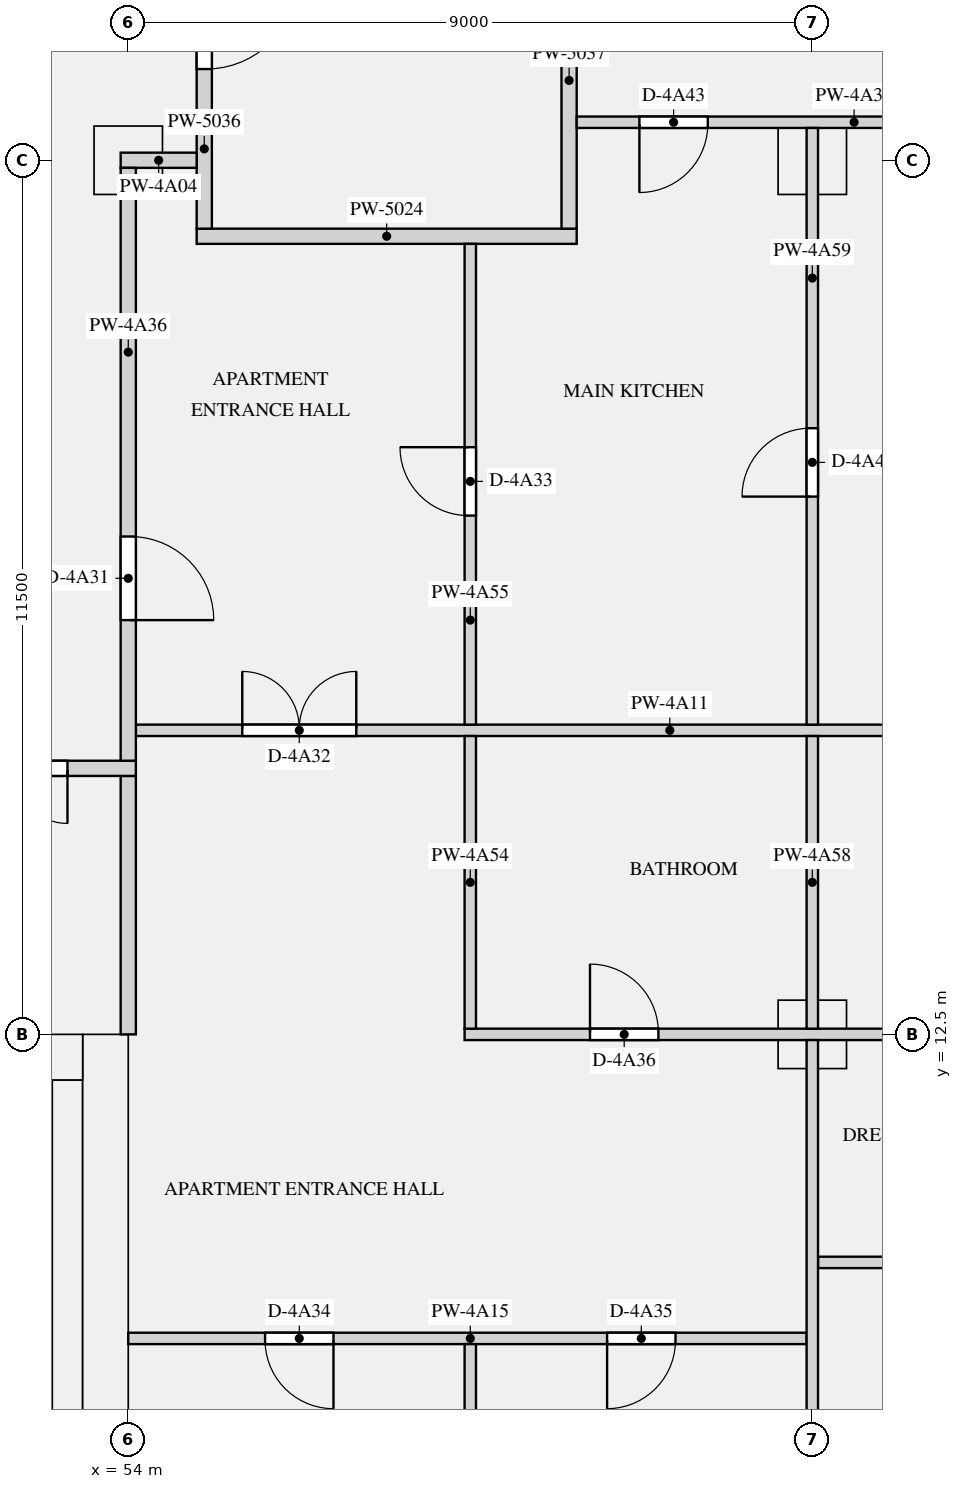
"""IFC4 building model, lengths in metres.
Left out: names, types, materials, properties, quantities, classifications, styles, units other than length and angle.
Written with IfcOpenShell. Run it as: python <this file> out.ifc"""

import sys

from ifc_helpers import new_model, si_unit, direction, frame, frame_2d, origin, origin_2d, place, context, subcontext, project, spatial, rectangle, extrude, element, fill, save


model = new_model("IFC4")
c1 = context("Model", 3, precision=1e-05, world=origin(), true_north=direction((0.0, 1.0)))
c2 = subcontext(c1, "Body", "Model", "MODEL_VIEW")
j1 = project(units=[si_unit("LENGTHUNIT", "METRE"), si_unit("PLANEANGLEUNIT", "RADIAN")], contexts=[c1])
p1 = place(None, origin())
s1 = spatial("IfcSite", under=j1, at=p1, CompositionType="ELEMENT")
p2 = place(p1, origin())
s2 = spatial("IfcBuilding", under=s1, at=p2, CompositionType="ELEMENT")
p3 = place(p2, frame((0.0, 0.0, 198.0)))
s3 = spatial("IfcBuildingStorey", under=s2, at=p3, CompositionType="ELEMENT", Elevation=198.0)
for number, where, z_axis, x_axis in (
    (1, (54.0, 24.0, 0.0), (0.0, 0.0, 1.0), (1.0, 0.0, 0.0)),
    (2, (63.0, 24.0, 0.0), (0.0, 0.0, 1.0), (1.0, 0.0, 0.0)),
    (3, (63.0, 12.5, 0.0), (0.0, 0.0, 1.0), (1.0, 0.0, 0.0)),
):
    element("IfcColumn", number, at=place(p3, frame(where, z_axis=z_axis, x_axis=x_axis)), inside=s3, PredefinedType="COLUMN", context=c2, shape_type="SweptSolid", body=[
        extrude(rectangle(XDim=0.9, YDim=0.9, at=origin_2d()), origin(), (0.0, 0.0, 1.0), 3.15),
    ])
p4 = place(p3, frame((53.7, 0.0, 0.0), z_axis=(0.0, 0.0, 1.0), x_axis=(0.0, 1.0, 0.0)))
e4 = element("IfcWall", 4, at=p4, inside=s3, PredefinedType="SHEAR", context=c2, shape_type="SweptSolid", body=[
    extrude(rectangle(XDim=12.5, YDim=0.6, at=frame_2d((6.25, 0.0))), origin(), (0.0, 0.0, 1.0), 3.15),
])
p5 = place(p3, frame((18.6, 12.2, 0.0), z_axis=(0.0, 0.0, 1.0), x_axis=(1.0, 0.0, 0.0)))
e5 = element("IfcWall", 5, at=p5, inside=s3, PredefinedType="SHEAR", context=c2, shape_type="SweptSolid", body=[
    extrude(rectangle(XDim=34.8, YDim=0.6, at=frame_2d((17.4, 0.0))), origin(), (0.0, 0.0, 1.0), 3.15),
])
p6 = place(p5, frame((24.575, 0.0, 0.0)))
e6 = element("IfcOpeningElement", 6, at=p6, cuts=e5, PredefinedType="OPENING", context=c2, shape_type="SweptSolid", body=[
    extrude(rectangle(XDim=1.1, YDim=2.1, at=frame_2d((0.55, 1.05))), frame((0.0, 0.31, 0.0), z_axis=(0.0, -1.0, 0.0), x_axis=(1.0, 0.0, 0.0)), (0.0, 0.0, 1.0), 0.62),
])
p7 = place(p5, frame((26.825, 0.0, 0.0)))
e7 = element("IfcOpeningElement", 7, at=p7, cuts=e5, PredefinedType="OPENING", context=c2, shape_type="SweptSolid", body=[
    extrude(rectangle(XDim=1.1, YDim=2.1, at=frame_2d((0.55, 1.05))), frame((0.0, 0.31, 0.0), z_axis=(0.0, -1.0, 0.0), x_axis=(1.0, 0.0, 0.0)), (0.0, 0.0, 1.0), 0.62),
])
p8 = place(p5, frame((29.075, 0.0, 0.0)))
e8 = element("IfcOpeningElement", 8, at=p8, cuts=e5, PredefinedType="OPENING", context=c2, shape_type="SweptSolid", body=[
    extrude(rectangle(XDim=1.1, YDim=2.1, at=frame_2d((0.55, 1.05))), frame((0.0, 0.31, 0.0), z_axis=(0.0, -1.0, 0.0), x_axis=(1.0, 0.0, 0.0)), (0.0, 0.0, 1.0), 0.62),
])
p9 = place(p5, frame((4.95, 0.0, 0.0)))
e9 = element("IfcOpeningElement", 9, at=p9, cuts=e5, PredefinedType="OPENING", context=c2, shape_type="SweptSolid", body=[
    extrude(rectangle(XDim=0.9, YDim=2.1, at=frame_2d((0.45, 1.05))), frame((0.0, 0.31, 0.0), z_axis=(0.0, -1.0, 0.0), x_axis=(1.0, 0.0, 0.0)), (0.0, 0.0, 1.0), 0.62),
])
p10 = place(p5, frame((18.45, 0.0, 0.0)))
e10 = element("IfcOpeningElement", 10, at=p10, cuts=e5, PredefinedType="OPENING", context=c2, shape_type="SweptSolid", body=[
    extrude(rectangle(XDim=0.9, YDim=2.1, at=frame_2d((0.45, 1.05))), frame((0.0, 0.31, 0.0), z_axis=(0.0, -1.0, 0.0), x_axis=(1.0, 0.0, 0.0)), (0.0, 0.0, 1.0), 0.62),
])
p11 = place(p5, frame((1.55, 0.0, 0.0)))
e11 = element("IfcOpeningElement", 11, at=p11, cuts=e5, PredefinedType="OPENING", context=c2, shape_type="SweptSolid", body=[
    extrude(rectangle(XDim=1.2, YDim=2.1, at=frame_2d((0.6, 1.05))), frame((0.0, 0.31, 0.0), z_axis=(0.0, -1.0, 0.0), x_axis=(1.0, 0.0, 0.0)), (0.0, 0.0, 1.0), 0.62),
])
p12 = place(p5, frame((32.05, 0.0, 0.0)))
e12 = element("IfcOpeningElement", 12, at=p12, cuts=e5, PredefinedType="OPENING", context=c2, shape_type="SweptSolid", body=[
    extrude(rectangle(XDim=1.2, YDim=2.1, at=frame_2d((0.6, 1.05))), frame((0.0, 0.31, 0.0), z_axis=(0.0, -1.0, 0.0), x_axis=(1.0, 0.0, 0.0)), (0.0, 0.0, 1.0), 0.62),
])
p13 = place(p3, frame((53.2, 1.0, 0.0), z_axis=(0.0, 0.0, 1.0), x_axis=(0.0, 1.0, 0.0)))
e13 = element("IfcWall", 13, at=p13, inside=s3, PredefinedType="SHEAR", context=c2, shape_type="SweptSolid", body=[
    extrude(rectangle(XDim=10.9, YDim=0.4, at=frame_2d((5.45, 0.0))), origin(), (0.0, 0.0, 1.0), 3.15),
])
p14 = place(p3, frame((54.9, 23.0, 0.0), z_axis=(0.0, 0.0, 1.0), x_axis=(1.0, 0.0, 0.0)))
e14 = element("IfcWall", 14, at=p14, inside=s3, PredefinedType="PARTITIONING", context=c2, shape_type="SweptSolid", body=[
    extrude(rectangle(XDim=5.0, YDim=0.2, at=frame_2d((2.5, 0.0))), origin(), (0.0, 0.0, 1.0), 2.83),
])
p15 = place(p3, frame((54.0, 12.5, 0.0), z_axis=(0.0, 0.0, 1.0), x_axis=(0.0, 1.0, 0.0)))
e15 = element("IfcWall", 15, at=p15, inside=s3, PredefinedType="PARTITIONING", context=c2, shape_type="SweptSolid", body=[
    extrude(rectangle(XDim=3.4, YDim=0.2, at=frame_2d((1.7, 0.0))), origin(), (0.0, 0.0, 1.0), 2.83),
])
p16 = place(p3, frame((55.0, 23.1, 0.0), z_axis=(0.0, 0.0, 1.0), x_axis=(0.0, 1.0, 0.0)))
e16 = element("IfcWall", 16, at=p16, inside=s3, PredefinedType="PARTITIONING", context=c2, shape_type="SweptSolid", body=[
    extrude(rectangle(XDim=3.8, YDim=0.2, at=frame_2d((1.9, 0.0))), origin(), (0.0, 0.0, 1.0), 2.83),
])
p17 = place(p16, frame((2.1, 0.0, 0.0)))
e17 = element("IfcOpeningElement", 17, at=p17, cuts=e16, PredefinedType="OPENING", context=c2, shape_type="SweptSolid", body=[
    extrude(rectangle(XDim=1.2, YDim=2.1, at=frame_2d((0.6, 1.05))), frame((0.0, 0.11, 0.0), z_axis=(0.0, -1.0, 0.0), x_axis=(1.0, 0.0, 0.0)), (0.0, 0.0, 1.0), 0.22),
])
p18 = place(p3, frame((59.8, 23.1, 0.0), z_axis=(0.0, 0.0, 1.0), x_axis=(0.0, 1.0, 0.0)))
e18 = element("IfcWall", 18, at=p18, inside=s3, PredefinedType="PARTITIONING", context=c2, shape_type="SweptSolid", body=[
    extrude(rectangle(XDim=3.9, YDim=0.2, at=frame_2d((1.95, 0.0))), origin(), (0.0, 0.0, 1.0), 2.83),
])
p19 = place(p3, frame((53.9, 24.0, 0.0), z_axis=(0.0, 0.0, 1.0), x_axis=(1.0, 0.0, 0.0)))
e19 = element("IfcWall", 19, at=p19, inside=s3, PredefinedType="PARTITIONING", context=c2, shape_type="SweptSolid", body=[
    extrude(rectangle(XDim=1.0, YDim=0.2, at=frame_2d((0.5, 0.0))), origin(), (0.0, 0.0, 1.0), 2.83),
])
p20 = place(p3, frame((54.1, 16.5, 0.0), z_axis=(0.0, 0.0, 1.0), x_axis=(1.0, 0.0, 0.0)))
e20 = element("IfcWall", 20, at=p20, inside=s3, PredefinedType="PARTITIONING", context=c2, shape_type="SweptSolid", body=[
    extrude(rectangle(XDim=14.75, YDim=0.15, at=frame_2d((7.375, 0.0))), origin(), (0.0, 0.0, 1.0), 2.83),
])
p21 = place(p20, frame((1.4, 0.0, 0.0)))
e21 = element("IfcOpeningElement", 21, at=p21, cuts=e20, PredefinedType="OPENING", context=c2, shape_type="SweptSolid", body=[
    extrude(rectangle(XDim=1.5, YDim=2.1, at=frame_2d((0.75, 1.05))), frame((0.0, 0.085, 0.0), z_axis=(0.0, -1.0, 0.0), x_axis=(1.0, 0.0, 0.0)), (0.0, 0.0, 1.0), 0.17),
])
p22 = place(p20, frame((11.15, 0.0, 0.0)))
e22 = element("IfcOpeningElement", 22, at=p22, cuts=e20, PredefinedType="OPENING", context=c2, shape_type="SweptSolid", body=[
    extrude(rectangle(XDim=1.5, YDim=2.1, at=frame_2d((0.75, 1.05))), frame((0.0, 0.085, 0.0), z_axis=(0.0, -1.0, 0.0), x_axis=(1.0, 0.0, 0.0)), (0.0, 0.0, 1.0), 0.17),
])
p23 = place(p3, frame((58.425, 12.5, 0.0), z_axis=(0.0, 0.0, 1.0), x_axis=(1.0, 0.0, 0.0)))
e23 = element("IfcWall", 23, at=p23, inside=s3, PredefinedType="PARTITIONING", context=c2, shape_type="SweptSolid", body=[
    extrude(rectangle(XDim=12.925, YDim=0.15, at=frame_2d((6.462, 0.0))), origin(), (0.0, 0.0, 1.0), 2.83),
])
p24 = place(p23, frame((1.65, 0.0, 0.0)))
e24 = element("IfcOpeningElement", 24, at=p24, cuts=e23, PredefinedType="OPENING", context=c2, shape_type="SweptSolid", body=[
    extrude(rectangle(XDim=0.9, YDim=2.1, at=frame_2d((0.45, 1.05))), frame((0.0, 0.085, 0.0), z_axis=(0.0, -1.0, 0.0), x_axis=(1.0, 0.0, 0.0)), (0.0, 0.0, 1.0), 0.17),
])
p25 = place(p23, frame((10.625, 0.0, 0.0)))
e25 = element("IfcOpeningElement", 25, at=p25, cuts=e23, PredefinedType="OPENING", context=c2, shape_type="SweptSolid", body=[
    extrude(rectangle(XDim=0.9, YDim=2.1, at=frame_2d((0.45, 1.05))), frame((0.0, 0.085, 0.0), z_axis=(0.0, -1.0, 0.0), x_axis=(1.0, 0.0, 0.0)), (0.0, 0.0, 1.0), 0.17),
])
p26 = place(p3, frame((54.0, 8.5, 0.0), z_axis=(0.0, 0.0, 1.0), x_axis=(1.0, 0.0, 0.0)))
e26 = element("IfcWall", 26, at=p26, inside=s3, PredefinedType="PARTITIONING", context=c2, shape_type="SweptSolid", body=[
    extrude(rectangle(XDim=8.925, YDim=0.15, at=frame_2d((4.462, 0.0))), origin(), (0.0, 0.0, 1.0), 2.83),
])
p27 = place(p26, frame((1.8, 0.0, 0.0)))
e27 = element("IfcOpeningElement", 27, at=p27, cuts=e26, PredefinedType="OPENING", context=c2, shape_type="SweptSolid", body=[
    extrude(rectangle(XDim=0.9, YDim=2.1, at=frame_2d((0.45, 1.05))), frame((0.0, 0.085, 0.0), z_axis=(0.0, -1.0, 0.0), x_axis=(1.0, 0.0, 0.0)), (0.0, 0.0, 1.0), 0.17),
])
p28 = place(p26, frame((6.3, 0.0, 0.0)))
e28 = element("IfcOpeningElement", 28, at=p28, cuts=e26, PredefinedType="OPENING", context=c2, shape_type="SweptSolid", body=[
    extrude(rectangle(XDim=0.9, YDim=2.1, at=frame_2d((0.45, 1.05))), frame((0.0, 0.085, 0.0), z_axis=(0.0, -1.0, 0.0), x_axis=(1.0, 0.0, 0.0)), (0.0, 0.0, 1.0), 0.17),
])
p29 = place(p3, frame((63.075, 9.5, 0.0), z_axis=(0.0, 0.0, 1.0), x_axis=(1.0, 0.0, 0.0)))
e29 = element("IfcWall", 29, at=p29, inside=s3, PredefinedType="PARTITIONING", context=c2, shape_type="SweptSolid", body=[
    extrude(rectangle(XDim=4.5, YDim=0.15, at=frame_2d((2.25, 0.0))), origin(), (0.0, 0.0, 1.0), 2.83),
])
p30 = place(p29, frame((1.725, 0.0, 0.0)))
e30 = element("IfcOpeningElement", 30, at=p30, cuts=e29, PredefinedType="OPENING", context=c2, shape_type="SweptSolid", body=[
    extrude(rectangle(XDim=0.9, YDim=2.1, at=frame_2d((0.45, 1.05))), frame((0.0, 0.085, 0.0), z_axis=(0.0, -1.0, 0.0), x_axis=(1.0, 0.0, 0.0)), (0.0, 0.0, 1.0), 0.17),
])
p31 = place(p3, frame((59.9, 24.5, 0.0), z_axis=(0.0, 0.0, 1.0), x_axis=(1.0, 0.0, 0.0)))
e31 = element("IfcWall", 31, at=p31, inside=s3, PredefinedType="PARTITIONING", context=c2, shape_type="SweptSolid", body=[
    extrude(rectangle(XDim=8.95, YDim=0.15, at=frame_2d((4.475, 0.0))), origin(), (0.0, 0.0, 1.0), 2.83),
])
p32 = place(p31, frame((5.575, 0.0, 0.0)))
e32 = element("IfcOpeningElement", 32, at=p32, cuts=e31, PredefinedType="OPENING", context=c2, shape_type="SweptSolid", body=[
    extrude(rectangle(XDim=1.5, YDim=2.1, at=frame_2d((0.75, 1.05))), frame((0.0, 0.085, 0.0), z_axis=(0.0, -1.0, 0.0), x_axis=(1.0, 0.0, 0.0)), (0.0, 0.0, 1.0), 0.17),
])
p33 = place(p31, frame((0.825, 0.0, 0.0)))
e33 = element("IfcOpeningElement", 33, at=p33, cuts=e31, PredefinedType="OPENING", context=c2, shape_type="SweptSolid", body=[
    extrude(rectangle(XDim=0.9, YDim=2.1, at=frame_2d((0.45, 1.05))), frame((0.0, 0.085, 0.0), z_axis=(0.0, -1.0, 0.0), x_axis=(1.0, 0.0, 0.0)), (0.0, 0.0, 1.0), 0.17),
])
p34 = place(p3, frame((17.9, 16.0, 0.0), z_axis=(0.0, 0.0, 1.0), x_axis=(1.0, 0.0, 0.0)))
e34 = element("IfcWall", 34, at=p34, inside=s3, PredefinedType="PARTITIONING", context=c2, shape_type="SweptSolid", body=[
    extrude(rectangle(XDim=36.2, YDim=0.2, at=frame_2d((18.1, 0.0))), origin(), (0.0, 0.0, 1.0), 2.83),
])
p35 = place(p34, frame((0.9, 0.0, 0.0)))
e35 = element("IfcOpeningElement", 35, at=p35, cuts=e34, PredefinedType="OPENING", context=c2, shape_type="SweptSolid", body=[
    extrude(rectangle(XDim=1.4, YDim=2.1, at=frame_2d((0.7, 1.05))), frame((0.0, 0.11, 0.0), z_axis=(0.0, -1.0, 0.0), x_axis=(1.0, 0.0, 0.0)), (0.0, 0.0, 1.0), 0.22),
])
p36 = place(p34, frame((33.9, 0.0, 0.0)))
e36 = element("IfcOpeningElement", 36, at=p36, cuts=e34, PredefinedType="OPENING", context=c2, shape_type="SweptSolid", body=[
    extrude(rectangle(XDim=1.4, YDim=2.1, at=frame_2d((0.7, 1.05))), frame((0.0, 0.11, 0.0), z_axis=(0.0, -1.0, 0.0), x_axis=(1.0, 0.0, 0.0)), (0.0, 0.0, 1.0), 0.22),
])
p37 = place(p3, frame((54.0, 16.1, 0.0), z_axis=(0.0, 0.0, 1.0), x_axis=(0.0, 1.0, 0.0)))
e37 = element("IfcWall", 37, at=p37, inside=s3, PredefinedType="PARTITIONING", context=c2, shape_type="SweptSolid", body=[
    extrude(rectangle(XDim=7.8, YDim=0.2, at=frame_2d((3.9, 0.0))), origin(), (0.0, 0.0, 1.0), 2.83),
])
p38 = place(p37, frame((1.85, 0.0, 0.0)))
e38 = element("IfcOpeningElement", 38, at=p38, cuts=e37, PredefinedType="OPENING", context=c2, shape_type="SweptSolid", body=[
    extrude(rectangle(XDim=1.1, YDim=2.1, at=frame_2d((0.55, 1.05))), frame((0.0, 0.11, 0.0), z_axis=(0.0, -1.0, 0.0), x_axis=(1.0, 0.0, 0.0)), (0.0, 0.0, 1.0), 0.22),
])
p39 = place(p3, frame((58.5, 0.65, 0.0), z_axis=(0.0, 0.0, 1.0), x_axis=(0.0, 1.0, 0.0)))
e39 = element("IfcWall", 39, at=p39, inside=s3, PredefinedType="PARTITIONING", context=c2, shape_type="SweptSolid", body=[
    extrude(rectangle(XDim=7.775, YDim=0.15, at=frame_2d((3.888, 0.0))), origin(), (0.0, 0.0, 1.0), 2.83),
])
p40 = place(p3, frame((58.5, 12.575, 0.0), z_axis=(0.0, 0.0, 1.0), x_axis=(0.0, 1.0, 0.0)))
e40 = element("IfcWall", 40, at=p40, inside=s3, PredefinedType="PARTITIONING", context=c2, shape_type="SweptSolid", body=[
    extrude(rectangle(XDim=3.85, YDim=0.15, at=frame_2d((1.925, 0.0))), origin(), (0.0, 0.0, 1.0), 2.83),
])
p41 = place(p3, frame((58.5, 16.575, 0.0), z_axis=(0.0, 0.0, 1.0), x_axis=(0.0, 1.0, 0.0)))
e41 = element("IfcWall", 41, at=p41, inside=s3, PredefinedType="PARTITIONING", context=c2, shape_type="SweptSolid", body=[
    extrude(rectangle(XDim=6.325, YDim=0.15, at=frame_2d((3.163, 0.0))), origin(), (0.0, 0.0, 1.0), 2.83),
])
p42 = place(p41, frame((2.75, 0.0, 0.0)))
e42 = element("IfcOpeningElement", 42, at=p42, cuts=e41, PredefinedType="OPENING", context=c2, shape_type="SweptSolid", body=[
    extrude(rectangle(XDim=0.9, YDim=2.1, at=frame_2d((0.45, 1.05))), frame((0.0, 0.085, 0.0), z_axis=(0.0, -1.0, 0.0), x_axis=(1.0, 0.0, 0.0)), (0.0, 0.0, 1.0), 0.17),
])
p43 = place(p3, frame((63.0, 0.65, 0.0), z_axis=(0.0, 0.0, 1.0), x_axis=(0.0, 1.0, 0.0)))
e43 = element("IfcWall", 43, at=p43, inside=s3, PredefinedType="PARTITIONING", context=c2, shape_type="SweptSolid", body=[
    extrude(rectangle(XDim=11.775, YDim=0.15, at=frame_2d((5.888, 0.0))), origin(), (0.0, 0.0, 1.0), 2.83),
])
p44 = place(p3, frame((63.0, 12.575, 0.0), z_axis=(0.0, 0.0, 1.0), x_axis=(0.0, 1.0, 0.0)))
e44 = element("IfcWall", 44, at=p44, inside=s3, PredefinedType="PARTITIONING", context=c2, shape_type="SweptSolid", body=[
    extrude(rectangle(XDim=3.85, YDim=0.15, at=frame_2d((1.925, 0.0))), origin(), (0.0, 0.0, 1.0), 2.83),
])
p45 = place(p3, frame((63.0, 16.575, 0.0), z_axis=(0.0, 0.0, 1.0), x_axis=(0.0, 1.0, 0.0)))
e45 = element("IfcWall", 45, at=p45, inside=s3, PredefinedType="PARTITIONING", context=c2, shape_type="SweptSolid", body=[
    extrude(rectangle(XDim=7.85, YDim=0.15, at=frame_2d((3.925, 0.0))), origin(), (0.0, 0.0, 1.0), 2.83),
])
p46 = place(p45, frame((3.0, 0.0, 0.0)))
e46 = element("IfcOpeningElement", 46, at=p46, cuts=e45, PredefinedType="OPENING", context=c2, shape_type="SweptSolid", body=[
    extrude(rectangle(XDim=0.9, YDim=2.1, at=frame_2d((0.45, 1.05))), frame((0.0, 0.085, 0.0), z_axis=(0.0, -1.0, 0.0), x_axis=(1.0, 0.0, 0.0)), (0.0, 0.0, 1.0), 0.17),
])
p47 = place(p17, frame((1.2, 0.0, 0.0), z_axis=(0.0, 0.0, 1.0), x_axis=(-1.0, 0.0, 0.0)))
e47 = element("IfcDoor", 47, at=p47, inside=s3, OperationType="SINGLE_SWING_LEFT", PredefinedType="DOOR", context=c2, shape_type="SweptSolid", body=[
    extrude(rectangle(XDim=1.2, YDim=2.1, at=frame_2d((0.6, 1.05))), frame((0.0, 0.025, 0.0), z_axis=(0.0, -1.0, 0.0), x_axis=(1.0, 0.0, 0.0)), (0.0, 0.0, 1.0), 0.05),
])
fill(e17, e47)
p48 = place(p36, frame((1.4, 0.0, 0.0), z_axis=(0.0, 0.0, 1.0), x_axis=(-1.0, 0.0, 0.0)))
e48 = element("IfcDoor", 48, at=p48, inside=s3, OperationType="DOUBLE_DOOR_SINGLE_SWING", PredefinedType="DOOR", context=c2, shape_type="SweptSolid", body=[
    extrude(rectangle(XDim=1.4, YDim=2.1, at=frame_2d((0.7, 1.05))), frame((0.0, 0.025, 0.0), z_axis=(0.0, -1.0, 0.0), x_axis=(1.0, 0.0, 0.0)), (0.0, 0.0, 1.0), 0.05),
])
fill(e36, e48)
p49 = place(p38, frame((1.1, 0.0, 0.0), z_axis=(0.0, 0.0, 1.0), x_axis=(-1.0, 0.0, 0.0)))
e49 = element("IfcDoor", 49, at=p49, inside=s3, OperationType="SINGLE_SWING_RIGHT", PredefinedType="DOOR", context=c2, shape_type="SweptSolid", body=[
    extrude(rectangle(XDim=1.1, YDim=2.1, at=frame_2d((0.55, 1.05))), frame((0.0, 0.025, 0.0), z_axis=(0.0, -1.0, 0.0), x_axis=(1.0, 0.0, 0.0)), (0.0, 0.0, 1.0), 0.05),
])
fill(e38, e49)
p50 = place(p21, origin())
e50 = element("IfcDoor", 50, at=p50, inside=s3, OperationType="DOUBLE_DOOR_SINGLE_SWING", PredefinedType="DOOR", context=c2, shape_type="SweptSolid", body=[
    extrude(rectangle(XDim=1.5, YDim=2.1, at=frame_2d((0.75, 1.05))), frame((0.0, 0.025, 0.0), z_axis=(0.0, -1.0, 0.0), x_axis=(1.0, 0.0, 0.0)), (0.0, 0.0, 1.0), 0.05),
])
fill(e21, e50)
p51 = place(p42, origin())
e51 = element("IfcDoor", 51, at=p51, inside=s3, OperationType="SINGLE_SWING_RIGHT", PredefinedType="DOOR", context=c2, shape_type="SweptSolid", body=[
    extrude(rectangle(XDim=0.9, YDim=2.1, at=frame_2d((0.45, 1.05))), frame((0.0, 0.025, 0.0), z_axis=(0.0, -1.0, 0.0), x_axis=(1.0, 0.0, 0.0)), (0.0, 0.0, 1.0), 0.05),
])
fill(e42, e51)
p52 = place(p27, frame((0.9, 0.0, 0.0), z_axis=(0.0, 0.0, 1.0), x_axis=(-1.0, 0.0, 0.0)))
e52 = element("IfcDoor", 52, at=p52, inside=s3, OperationType="SINGLE_SWING_LEFT", PredefinedType="DOOR", context=c2, shape_type="SweptSolid", body=[
    extrude(rectangle(XDim=0.9, YDim=2.1, at=frame_2d((0.45, 1.05))), frame((0.0, 0.025, 0.0), z_axis=(0.0, -1.0, 0.0), x_axis=(1.0, 0.0, 0.0)), (0.0, 0.0, 1.0), 0.05),
])
fill(e27, e52)
p53 = place(p28, frame((0.9, 0.0, 0.0), z_axis=(0.0, 0.0, 1.0), x_axis=(-1.0, 0.0, 0.0)))
e53 = element("IfcDoor", 53, at=p53, inside=s3, OperationType="SINGLE_SWING_RIGHT", PredefinedType="DOOR", context=c2, shape_type="SweptSolid", body=[
    extrude(rectangle(XDim=0.9, YDim=2.1, at=frame_2d((0.45, 1.05))), frame((0.0, 0.025, 0.0), z_axis=(0.0, -1.0, 0.0), x_axis=(1.0, 0.0, 0.0)), (0.0, 0.0, 1.0), 0.05),
])
fill(e28, e53)
p54 = place(p24, origin())
e54 = element("IfcDoor", 54, at=p54, inside=s3, OperationType="SINGLE_SWING_LEFT", PredefinedType="DOOR", context=c2, shape_type="SweptSolid", body=[
    extrude(rectangle(XDim=0.9, YDim=2.1, at=frame_2d((0.45, 1.05))), frame((0.0, 0.025, 0.0), z_axis=(0.0, -1.0, 0.0), x_axis=(1.0, 0.0, 0.0)), (0.0, 0.0, 1.0), 0.05),
])
fill(e24, e54)
p55 = place(p46, origin())
e55 = element("IfcDoor", 55, at=p55, inside=s3, OperationType="SINGLE_SWING_LEFT", PredefinedType="DOOR", context=c2, shape_type="SweptSolid", body=[
    extrude(rectangle(XDim=0.9, YDim=2.1, at=frame_2d((0.45, 1.05))), frame((0.0, 0.025, 0.0), z_axis=(0.0, -1.0, 0.0), x_axis=(1.0, 0.0, 0.0)), (0.0, 0.0, 1.0), 0.05),
])
fill(e46, e55)
p56 = place(p33, frame((0.9, 0.0, 0.0), z_axis=(0.0, 0.0, 1.0), x_axis=(-1.0, 0.0, 0.0)))
e56 = element("IfcDoor", 56, at=p56, inside=s3, OperationType="SINGLE_SWING_RIGHT", PredefinedType="DOOR", context=c2, shape_type="SweptSolid", body=[
    extrude(rectangle(XDim=0.9, YDim=2.1, at=frame_2d((0.45, 1.05))), frame((0.0, 0.025, 0.0), z_axis=(0.0, -1.0, 0.0), x_axis=(1.0, 0.0, 0.0)), (0.0, 0.0, 1.0), 0.05),
])
fill(e33, e56)
save(model, sys.argv[1])
